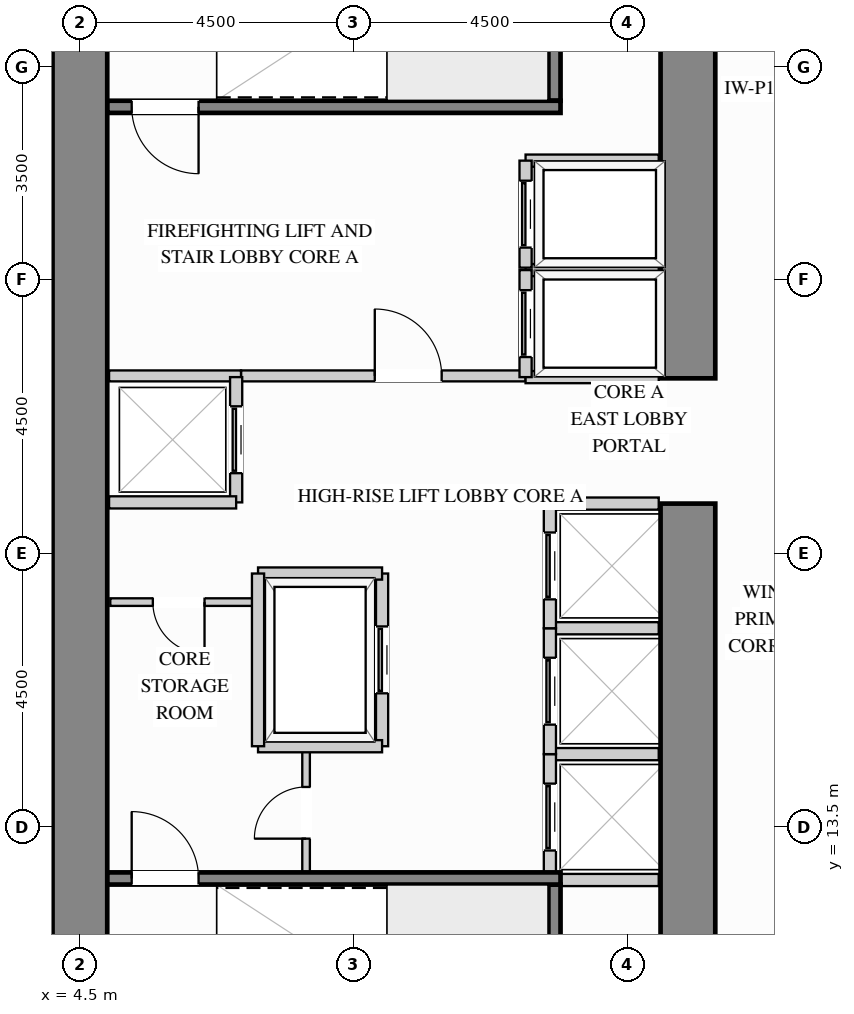
"""IFC4 building model, lengths in metres.
Left out: names, types, materials, properties, quantities, classifications, styles, units other than length and angle.
Written with IfcOpenShell. Run it as: python <this file> out.ifc"""

import sys

from ifc_helpers import new_model, si_unit, direction, frame, frame_2d, origin, place, context, subcontext, project, spatial, rectangle, extrude, source, transform, mapped, element, fill, save


model = new_model("IFC4")
c1 = context("Model", 3, precision=1e-05, world=origin(), true_north=direction((0.0, 1.0)))
c2 = subcontext(c1, "Body", "Model", "MODEL_VIEW")
j1 = project(units=[si_unit("LENGTHUNIT", "METRE"), si_unit("PLANEANGLEUNIT", "RADIAN")], contexts=[c1])
p1 = place(None, origin())
s1 = spatial("IfcSite", under=j1, at=p1, CompositionType="ELEMENT")
p2 = place(p1, origin())
s2 = spatial("IfcBuilding", under=s1, at=p2, CompositionType="ELEMENT")
p3 = place(p2, frame((0.0, 0.0, 40.5)))
s3 = spatial("IfcBuildingStorey", under=s2, at=p3, CompositionType="ELEMENT", Elevation=40.5)
m1 = source(origin(), c2, "Body", "SweptSolid", [
    extrude(rectangle(XDim=9.87, YDim=0.9, at=frame_2d((4.935, 0.0))), origin(), (0.0, 0.0, 1.0), 3.38),
])
p4 = place(p3, frame((14.5, 8.95, 0.0), z_axis=(0.0, 0.0, 1.0), x_axis=(0.0, 1.0, 0.0)))
e1 = element("IfcWall", 1, at=p4, inside=s3, PredefinedType="SHEAR", context=c2, shape_type="MappedRepresentation", body=[
    mapped(m1, transform((0.0, 0.0, 0.0), x_axis=(1.0, 0.0, 0.0), y_axis=(0.0, 1.0, 0.0), z_axis=(0.0, 0.0, 1.0))),
])
m2 = source(origin(), c2, "Body", "SweptSolid", [
    extrude(rectangle(XDim=8.17, YDim=0.9, at=frame_2d((4.085, 0.0))), origin(), (0.0, 0.0, 1.0), 3.38),
])
p5 = place(p3, frame((14.5, 20.88, 0.0), z_axis=(0.0, 0.0, 1.0), x_axis=(0.0, 1.0, 0.0)))
e2 = element("IfcWall", 2, at=p5, inside=s3, PredefinedType="SHEAR", context=c2, shape_type="MappedRepresentation", body=[
    mapped(m2, transform((0.0, 0.0, 0.0), x_axis=(1.0, 0.0, 0.0), y_axis=(0.0, 1.0, 0.0), z_axis=(0.0, 0.0, 1.0))),
])
m3 = source(origin(), c2, "Body", "SweptSolid", [
    extrude(rectangle(XDim=20.1, YDim=0.9, at=frame_2d((10.05, 0.0))), origin(), (0.0, 0.0, 1.0), 3.38),
])
p6 = place(p3, frame((4.5, 8.95, 0.0), z_axis=(0.0, 0.0, 1.0), x_axis=(0.0, 1.0, 0.0)))
e3 = element("IfcWall", 3, at=p6, inside=s3, PredefinedType="SHEAR", context=c2, shape_type="MappedRepresentation", body=[
    mapped(m3, transform((0.0, 0.0, 0.0), x_axis=(1.0, 0.0, 0.0), y_axis=(0.0, 1.0, 0.0), z_axis=(0.0, 0.0, 1.0))),
])
p7 = place(p3, frame((7.15, 20.92, 0.0), z_axis=(0.0, 0.0, 1.0), x_axis=(1.0, 0.0, 0.0)))
e4 = element("IfcWall", 4, at=p7, inside=s3, PredefinedType="PARTITIONING", context=c2, shape_type="SweptSolid", body=[
    extrude(rectangle(XDim=4.68, YDim=0.18, at=frame_2d((2.34, 0.0))), origin(), (0.0, 0.0, 1.0), 3.365),
])
p8 = place(p7, frame((2.2, 0.0, 0.0)))
e5 = element("IfcOpeningElement", 5, at=p8, cuts=e4, PredefinedType="OPENING", context=c2, shape_type="SweptSolid", body=[
    extrude(rectangle(XDim=1.1, YDim=2.15, at=frame_2d((0.55, 1.075))), frame((0.0, 0.1, 0.0), z_axis=(0.0, -1.0, 0.0), x_axis=(1.0, 0.0, 0.0)), (0.0, 0.0, 1.0), 0.2),
])
m4 = source(origin(), c2, "Body", "SweptSolid", [
    extrude(rectangle(XDim=2.17, YDim=0.18, at=frame_2d((1.085, 0.0))), origin(), (0.0, 0.0, 1.0), 3.365),
])
p9 = place(p3, frame((4.98, 20.92, 0.0), z_axis=(0.0, 0.0, 1.0), x_axis=(1.0, 0.0, 0.0)))
e6 = element("IfcWall", 6, at=p9, inside=s3, PredefinedType="PARTITIONING", context=c2, shape_type="MappedRepresentation", body=[
    mapped(m4, transform((0.0, 0.0, 0.0), x_axis=(1.0, 0.0, 0.0), y_axis=(0.0, 1.0, 0.0), z_axis=(0.0, 0.0, 1.0))),
])
p10 = place(p3, frame((8.22, 12.75, 0.0), z_axis=(0.0, 0.0, 1.0), x_axis=(0.0, 1.0, 0.0)))
e7 = element("IfcWall", 7, at=p10, inside=s3, PredefinedType="PARTITIONING", context=c2, shape_type="SweptSolid", body=[
    extrude(rectangle(XDim=2.07, YDim=0.125, at=frame_2d((1.035, 0.0))), origin(), (0.0, 0.0, 1.0), 3.365),
])
p11 = place(p10, frame((0.56, 0.0, 0.0)))
e8 = element("IfcOpeningElement", 8, at=p11, cuts=e7, PredefinedType="OPENING", context=c2, shape_type="SweptSolid", body=[
    extrude(rectangle(XDim=0.85, YDim=2.1, at=frame_2d((0.425, 1.05))), frame((0.0, 0.073, 0.0), z_axis=(0.0, -1.0, 0.0), x_axis=(1.0, 0.0, 0.0)), (0.0, 0.0, 1.0), 0.145),
])
p12 = place(p3, frame((5.0, 17.2, 0.0), z_axis=(0.0, 0.0, 1.0), x_axis=(1.0, 0.0, 0.0)))
e9 = element("IfcWall", 9, at=p12, inside=s3, PredefinedType="PARTITIONING", context=c2, shape_type="SweptSolid", body=[
    extrude(rectangle(XDim=2.4, YDim=0.125, at=frame_2d((1.2, 0.0))), origin(), (0.0, 0.0, 1.0), 3.365),
])
p13 = place(p12, frame((0.7, 0.0, 0.0)))
e10 = element("IfcOpeningElement", 10, at=p13, cuts=e9, PredefinedType="OPENING", context=c2, shape_type="SweptSolid", body=[
    extrude(rectangle(XDim=0.85, YDim=2.1, at=frame_2d((0.425, 1.05))), frame((0.0, 0.073, 0.0), z_axis=(0.0, -1.0, 0.0), x_axis=(1.0, 0.0, 0.0)), (0.0, 0.0, 1.0), 0.145),
])
m5 = source(origin(), c2, "Body", "SweptSolid", [
    extrude(rectangle(XDim=2.19, YDim=0.2, at=frame_2d((1.095, 0.0))), origin(), (0.0, 0.0, 1.0), 3.365),
])
for number, where, z_axis, x_axis in (
    (11, (11.83, 22.66, 0.0), (0.0, 0.0, 1.0), (1.0, 0.0, 0.0)),
    (12, (11.83, 20.9, 0.0), (0.0, 0.0, 1.0), (1.0, 0.0, 0.0)),
):
    element("IfcWall", number, at=place(p3, frame(where, z_axis=z_axis, x_axis=x_axis)), inside=s3, PredefinedType="PARTITIONING", context=c2, shape_type="MappedRepresentation", body=[
        mapped(m5, transform((0.0, 0.0, 0.0), x_axis=(1.0, 0.0, 0.0), y_axis=(0.0, 1.0, 0.0), z_axis=(0.0, 0.0, 1.0))),
    ])
p14 = place(p3, frame((11.83, 20.9, 0.0), z_axis=(0.0, 0.0, 1.0), x_axis=(0.0, 1.0, 0.0)))
e13 = element("IfcWall", 13, at=p14, inside=s3, PredefinedType="PARTITIONING", context=c2, shape_type="SweptSolid", body=[
    extrude(rectangle(XDim=1.76, YDim=0.2, at=frame_2d((0.88, 0.0))), origin(), (0.0, 0.0, 1.0), 3.365),
])
p15 = place(p14, frame((0.33, 0.0, 0.0)))
e14 = element("IfcOpeningElement", 14, at=p15, cuts=e13, PredefinedType="OPENING", context=c2, shape_type="SweptSolid", body=[
    extrude(rectangle(XDim=1.1, YDim=2.2, at=frame_2d((0.55, 1.1))), frame((0.0, 0.11, 0.0), z_axis=(0.0, -1.0, 0.0), x_axis=(1.0, 0.0, 0.0)), (0.0, 0.0, 1.0), 0.22),
])
p16 = place(p3, frame((11.83, 24.46, 0.0), z_axis=(0.0, 0.0, 1.0), x_axis=(1.0, 0.0, 0.0)))
e15 = element("IfcWall", 15, at=p16, inside=s3, PredefinedType="PARTITIONING", context=c2, shape_type="MappedRepresentation", body=[
    mapped(m5, transform((0.0, 0.0, 0.0), x_axis=(1.0, 0.0, 0.0), y_axis=(0.0, 1.0, 0.0), z_axis=(0.0, 0.0, 1.0))),
])
p17 = place(p3, frame((11.83, 22.7, 0.0), z_axis=(0.0, 0.0, 1.0), x_axis=(0.0, 1.0, 0.0)))
e16 = element("IfcWall", 16, at=p17, inside=s3, PredefinedType="PARTITIONING", context=c2, shape_type="SweptSolid", body=[
    extrude(rectangle(XDim=1.76, YDim=0.2, at=frame_2d((0.88, 0.0))), origin(), (0.0, 0.0, 1.0), 3.365),
])
p18 = place(p17, frame((0.33, 0.0, 0.0)))
e17 = element("IfcOpeningElement", 17, at=p18, cuts=e16, PredefinedType="OPENING", context=c2, shape_type="SweptSolid", body=[
    extrude(rectangle(XDim=1.1, YDim=2.2, at=frame_2d((0.55, 1.1))), frame((0.0, 0.11, 0.0), z_axis=(0.0, -1.0, 0.0), x_axis=(1.0, 0.0, 0.0)), (0.0, 0.0, 1.0), 0.22),
])
m6 = source(origin(), c2, "Body", "SweptSolid", [
    extrude(rectangle(XDim=1.79, YDim=0.2, at=frame_2d((0.895, 0.0))), origin(), (0.0, 0.0, 1.0), 3.365),
])
for number, where, z_axis, x_axis in (
    (18, (12.23, 14.7, 0.0), (0.0, 0.0, 1.0), (1.0, 0.0, 0.0)),
    (19, (12.23, 12.63, 0.0), (0.0, 0.0, 1.0), (1.0, 0.0, 0.0)),
):
    element("IfcWall", number, at=place(p3, frame(where, z_axis=z_axis, x_axis=x_axis)), inside=s3, PredefinedType="PARTITIONING", context=c2, shape_type="MappedRepresentation", body=[
        mapped(m6, transform((0.0, 0.0, 0.0), x_axis=(1.0, 0.0, 0.0), y_axis=(0.0, 1.0, 0.0), z_axis=(0.0, 0.0, 1.0))),
    ])
p19 = place(p3, frame((12.23, 12.63, 0.0), z_axis=(0.0, 0.0, 1.0), x_axis=(0.0, 1.0, 0.0)))
e20 = element("IfcWall", 20, at=p19, inside=s3, PredefinedType="PARTITIONING", context=c2, shape_type="SweptSolid", body=[
    extrude(rectangle(XDim=2.07, YDim=0.2, at=frame_2d((1.035, 0.0))), origin(), (0.0, 0.0, 1.0), 3.365),
])
p20 = place(p19, frame((0.485, 0.0, 0.0)))
e21 = element("IfcOpeningElement", 21, at=p20, cuts=e20, PredefinedType="OPENING", context=c2, shape_type="SweptSolid", body=[
    extrude(rectangle(XDim=1.1, YDim=2.2, at=frame_2d((0.55, 1.1))), frame((0.0, 0.11, 0.0), z_axis=(0.0, -1.0, 0.0), x_axis=(1.0, 0.0, 0.0)), (0.0, 0.0, 1.0), 0.22),
])
p21 = place(p3, frame((12.23, 16.77, 0.0), z_axis=(0.0, 0.0, 1.0), x_axis=(1.0, 0.0, 0.0)))
e22 = element("IfcWall", 22, at=p21, inside=s3, PredefinedType="PARTITIONING", context=c2, shape_type="MappedRepresentation", body=[
    mapped(m6, transform((0.0, 0.0, 0.0), x_axis=(1.0, 0.0, 0.0), y_axis=(0.0, 1.0, 0.0), z_axis=(0.0, 0.0, 1.0))),
])
p22 = place(p3, frame((12.23, 14.7, 0.0), z_axis=(0.0, 0.0, 1.0), x_axis=(0.0, 1.0, 0.0)))
e23 = element("IfcWall", 23, at=p22, inside=s3, PredefinedType="PARTITIONING", context=c2, shape_type="SweptSolid", body=[
    extrude(rectangle(XDim=2.07, YDim=0.2, at=frame_2d((1.035, 0.0))), origin(), (0.0, 0.0, 1.0), 3.365),
])
p23 = place(p22, frame((0.485, 0.0, 0.0)))
e24 = element("IfcOpeningElement", 24, at=p23, cuts=e23, PredefinedType="OPENING", context=c2, shape_type="SweptSolid", body=[
    extrude(rectangle(XDim=1.1, YDim=2.2, at=frame_2d((0.55, 1.1))), frame((0.0, 0.11, 0.0), z_axis=(0.0, -1.0, 0.0), x_axis=(1.0, 0.0, 0.0)), (0.0, 0.0, 1.0), 0.22),
])
p24 = place(p3, frame((12.23, 18.82, 0.0), z_axis=(0.0, 0.0, 1.0), x_axis=(1.0, 0.0, 0.0)))
e25 = element("IfcWall", 25, at=p24, inside=s3, PredefinedType="PARTITIONING", context=c2, shape_type="MappedRepresentation", body=[
    mapped(m6, transform((0.0, 0.0, 0.0), x_axis=(1.0, 0.0, 0.0), y_axis=(0.0, 1.0, 0.0), z_axis=(0.0, 0.0, 1.0))),
])
p25 = place(p3, frame((12.23, 16.77, 0.0), z_axis=(0.0, 0.0, 1.0), x_axis=(0.0, 1.0, 0.0)))
e26 = element("IfcWall", 26, at=p25, inside=s3, PredefinedType="PARTITIONING", context=c2, shape_type="SweptSolid", body=[
    extrude(rectangle(XDim=2.05, YDim=0.2, at=frame_2d((1.025, 0.0))), origin(), (0.0, 0.0, 1.0), 3.365),
])
p26 = place(p25, frame((0.475, 0.0, 0.0)))
e27 = element("IfcOpeningElement", 27, at=p26, cuts=e26, PredefinedType="OPENING", context=c2, shape_type="SweptSolid", body=[
    extrude(rectangle(XDim=1.1, YDim=2.2, at=frame_2d((0.55, 1.1))), frame((0.0, 0.11, 0.0), z_axis=(0.0, -1.0, 0.0), x_axis=(1.0, 0.0, 0.0)), (0.0, 0.0, 1.0), 0.22),
])
p27 = place(p3, frame((7.07, 18.84, 0.0), z_axis=(0.0, 0.0, 1.0), x_axis=(0.0, 1.0, 0.0)))
e28 = element("IfcWall", 28, at=p27, inside=s3, PredefinedType="PARTITIONING", context=c2, shape_type="SweptSolid", body=[
    extrude(rectangle(XDim=2.06, YDim=0.2, at=frame_2d((1.03, 0.0))), origin(), (0.0, 0.0, 1.0), 3.365),
])
p28 = place(p27, frame((0.48, 0.0, 0.0)))
e29 = element("IfcOpeningElement", 29, at=p28, cuts=e28, PredefinedType="OPENING", context=c2, shape_type="SweptSolid", body=[
    extrude(rectangle(XDim=1.1, YDim=2.2, at=frame_2d((0.55, 1.1))), frame((0.0, 0.11, 0.0), z_axis=(0.0, -1.0, 0.0), x_axis=(1.0, 0.0, 0.0)), (0.0, 0.0, 1.0), 0.22),
])
m7 = source(origin(), c2, "Body", "SweptSolid", [
    extrude(rectangle(XDim=2.09, YDim=0.2, at=frame_2d((1.045, 0.0))), origin(), (0.0, 0.0, 1.0), 3.365),
])
p29 = place(p3, frame((4.98, 18.84, 0.0), z_axis=(0.0, 0.0, 1.0), x_axis=(1.0, 0.0, 0.0)))
e30 = element("IfcWall", 30, at=p29, inside=s3, PredefinedType="PARTITIONING", context=c2, shape_type="MappedRepresentation", body=[
    mapped(m7, transform((0.0, 0.0, 0.0), x_axis=(1.0, 0.0, 0.0), y_axis=(0.0, 1.0, 0.0), z_axis=(0.0, 0.0, 1.0))),
])
p30 = place(p3, frame((9.47, 14.83, 0.0), z_axis=(0.0, 0.0, 1.0), x_axis=(0.0, 1.0, 0.0)))
e31 = element("IfcWall", 31, at=p30, inside=s3, PredefinedType="PARTITIONING", context=c2, shape_type="SweptSolid", body=[
    extrude(rectangle(XDim=2.84, YDim=0.2, at=frame_2d((1.42, 0.0))), origin(), (0.0, 0.0, 1.0), 3.365),
])
p31 = place(p30, frame((0.87, 0.0, 0.0)))
e32 = element("IfcOpeningElement", 32, at=p31, cuts=e31, PredefinedType="OPENING", context=c2, shape_type="SweptSolid", body=[
    extrude(rectangle(XDim=1.1, YDim=2.2, at=frame_2d((0.55, 1.1))), frame((0.0, 0.11, 0.0), z_axis=(0.0, -1.0, 0.0), x_axis=(1.0, 0.0, 0.0)), (0.0, 0.0, 1.0), 0.22),
])
m8 = source(origin(), c2, "Body", "SweptSolid", [
    extrude(rectangle(XDim=2.04, YDim=0.2, at=frame_2d((1.02, 0.0))), origin(), (0.0, 0.0, 1.0), 3.365),
])
for number, where, z_axis, x_axis in (
    (33, (7.43, 17.67, 0.0), (0.0, 0.0, 1.0), (1.0, 0.0, 0.0)),
    (34, (7.43, 14.83, 0.0), (0.0, 0.0, 1.0), (1.0, 0.0, 0.0)),
):
    element("IfcWall", number, at=place(p3, frame(where, z_axis=z_axis, x_axis=x_axis)), inside=s3, PredefinedType="PARTITIONING", context=c2, shape_type="MappedRepresentation", body=[
        mapped(m8, transform((0.0, 0.0, 0.0), x_axis=(1.0, 0.0, 0.0), y_axis=(0.0, 1.0, 0.0), z_axis=(0.0, 0.0, 1.0))),
    ])
m9 = source(origin(), c2, "Body", "SweptSolid", [
    extrude(rectangle(XDim=2.84, YDim=0.2, at=frame_2d((1.42, 0.0))), origin(), (0.0, 0.0, 1.0), 3.365),
])
p32 = place(p3, frame((7.43, 14.83, 0.0), z_axis=(0.0, 0.0, 1.0), x_axis=(0.0, 1.0, 0.0)))
e35 = element("IfcWall", 35, at=p32, inside=s3, PredefinedType="PARTITIONING", context=c2, shape_type="MappedRepresentation", body=[
    mapped(m9, transform((0.0, 0.0, 0.0), x_axis=(1.0, 0.0, 0.0), y_axis=(0.0, 1.0, 0.0), z_axis=(0.0, 0.0, 1.0))),
])
m10 = source(origin(), c2, "Body", "SweptSolid", [
    extrude(rectangle(XDim=3.603, YDim=0.2, at=frame_2d((1.802, 0.0))), origin(), (0.0, 0.0, 1.0), 3.38),
])
p33 = place(p3, frame((12.305, 8.952, 0.0), z_axis=(0.0, 0.0, 1.0), x_axis=(0.0, 1.0, 0.0)))
e36 = element("IfcWall", 36, at=p33, inside=s3, PredefinedType="SHEAR", context=c2, shape_type="MappedRepresentation", body=[
    mapped(m10, transform((0.0, 0.0, 0.0), x_axis=(1.0, 0.0, 0.0), y_axis=(0.0, 1.0, 0.0), z_axis=(0.0, 0.0, 1.0))),
])
p34 = place(p3, frame((4.952, 12.655, 0.0), z_axis=(0.0, 0.0, 1.0), x_axis=(1.0, 0.0, 0.0)))
e37 = element("IfcWall", 37, at=p34, inside=s3, PredefinedType="SHEAR", context=c2, shape_type="SweptSolid", body=[
    extrude(rectangle(XDim=7.453, YDim=0.2, at=frame_2d((3.727, 0.0))), origin(), (0.0, 0.0, 1.0), 3.38),
])
p35 = place(p34, frame((0.4, 0.0, 0.0)))
e38 = element("IfcOpeningElement", 38, at=p35, cuts=e37, PredefinedType="OPENING", context=c2, shape_type="SweptSolid", body=[
    extrude(rectangle(XDim=1.1, YDim=2.15, at=frame_2d((0.55, 1.075))), frame((0.0, 0.11, 0.0), z_axis=(0.0, -1.0, 0.0), x_axis=(1.0, 0.0, 0.0)), (0.0, 0.0, 1.0), 0.22),
])
p36 = place(p3, frame((12.305, 25.445, 0.0), z_axis=(0.0, 0.0, 1.0), x_axis=(0.0, 1.0, 0.0)))
e39 = element("IfcWall", 39, at=p36, inside=s3, PredefinedType="SHEAR", context=c2, shape_type="MappedRepresentation", body=[
    mapped(m10, transform((0.0, 0.0, 0.0), x_axis=(1.0, 0.0, 0.0), y_axis=(0.0, 1.0, 0.0), z_axis=(0.0, 0.0, 1.0))),
])
p37 = place(p3, frame((4.952, 25.345, 0.0), z_axis=(0.0, 0.0, 1.0), x_axis=(1.0, 0.0, 0.0)))
e40 = element("IfcWall", 40, at=p37, inside=s3, PredefinedType="SHEAR", context=c2, shape_type="SweptSolid", body=[
    extrude(rectangle(XDim=7.453, YDim=0.2, at=frame_2d((3.727, 0.0))), origin(), (0.0, 0.0, 1.0), 3.38),
])
p38 = place(p37, frame((0.4, 0.0, 0.0)))
e41 = element("IfcOpeningElement", 41, at=p38, cuts=e40, PredefinedType="OPENING", context=c2, shape_type="SweptSolid", body=[
    extrude(rectangle(XDim=1.1, YDim=2.15, at=frame_2d((0.55, 1.075))), frame((0.0, 0.11, 0.0), z_axis=(0.0, -1.0, 0.0), x_axis=(1.0, 0.0, 0.0)), (0.0, 0.0, 1.0), 0.22),
])
m11 = source(origin(), c2, "Body", "SweptSolid", [
    extrude(rectangle(XDim=1.1, YDim=2.15, at=frame_2d((0.55, 1.075))), frame((0.0, 0.025, 0.0), z_axis=(0.0, -1.0, 0.0), x_axis=(1.0, 0.0, 0.0)), (0.0, 0.0, 1.0), 0.05),
])
p39 = place(p8, origin())
e42 = element("IfcDoor", 42, at=p39, inside=s3, OperationType="SINGLE_SWING_LEFT", PredefinedType="DOOR", context=c2, shape_type="MappedRepresentation", body=[
    mapped(m11, transform((0.0, 0.0, 0.0), x_axis=(1.0, 0.0, 0.0), y_axis=(0.0, 1.0, 0.0), z_axis=(0.0, 0.0, 1.0))),
])
fill(e5, e42)
m12 = source(origin(), c2, "Body", "SweptSolid", [
    extrude(rectangle(XDim=1.1, YDim=2.2, at=frame_2d((0.55, 1.1))), frame((0.0, 0.025, 0.0), z_axis=(0.0, -1.0, 0.0), x_axis=(1.0, 0.0, 0.0)), (0.0, 0.0, 1.0), 0.05),
])
p40 = place(p15, origin())
e43 = element("IfcDoor", 43, at=p40, inside=s3, OperationType="SLIDING_TO_LEFT", PredefinedType="DOOR", context=c2, shape_type="MappedRepresentation", body=[
    mapped(m12, transform((0.0, 0.0, 0.0), x_axis=(1.0, 0.0, 0.0), y_axis=(0.0, 1.0, 0.0), z_axis=(0.0, 0.0, 1.0))),
])
fill(e14, e43)
p41 = place(p18, origin())
e44 = element("IfcDoor", 44, at=p41, inside=s3, OperationType="SLIDING_TO_LEFT", PredefinedType="DOOR", context=c2, shape_type="MappedRepresentation", body=[
    mapped(m12, transform((0.0, 0.0, 0.0), x_axis=(1.0, 0.0, 0.0), y_axis=(0.0, 1.0, 0.0), z_axis=(0.0, 0.0, 1.0))),
])
fill(e17, e44)
p42 = place(p20, origin())
e45 = element("IfcDoor", 45, at=p42, inside=s3, OperationType="SLIDING_TO_LEFT", PredefinedType="DOOR", context=c2, shape_type="MappedRepresentation", body=[
    mapped(m12, transform((0.0, 0.0, 0.0), x_axis=(1.0, 0.0, 0.0), y_axis=(0.0, 1.0, 0.0), z_axis=(0.0, 0.0, 1.0))),
])
fill(e21, e45)
p43 = place(p23, origin())
e46 = element("IfcDoor", 46, at=p43, inside=s3, OperationType="SLIDING_TO_LEFT", PredefinedType="DOOR", context=c2, shape_type="MappedRepresentation", body=[
    mapped(m12, transform((0.0, 0.0, 0.0), x_axis=(1.0, 0.0, 0.0), y_axis=(0.0, 1.0, 0.0), z_axis=(0.0, 0.0, 1.0))),
])
fill(e24, e46)
p44 = place(p26, origin())
e47 = element("IfcDoor", 47, at=p44, inside=s3, OperationType="SLIDING_TO_LEFT", PredefinedType="DOOR", context=c2, shape_type="MappedRepresentation", body=[
    mapped(m12, transform((0.0, 0.0, 0.0), x_axis=(1.0, 0.0, 0.0), y_axis=(0.0, 1.0, 0.0), z_axis=(0.0, 0.0, 1.0))),
])
fill(e27, e47)
p45 = place(p28, origin())
e48 = element("IfcDoor", 48, at=p45, inside=s3, OperationType="SLIDING_TO_LEFT", PredefinedType="DOOR", context=c2, shape_type="MappedRepresentation", body=[
    mapped(m12, transform((0.0, 0.0, 0.0), x_axis=(1.0, 0.0, 0.0), y_axis=(0.0, 1.0, 0.0), z_axis=(0.0, 0.0, 1.0))),
])
fill(e29, e48)
p46 = place(p31, origin())
e49 = element("IfcDoor", 49, at=p46, inside=s3, OperationType="SLIDING_TO_LEFT", PredefinedType="DOOR", context=c2, shape_type="MappedRepresentation", body=[
    mapped(m12, transform((0.0, 0.0, 0.0), x_axis=(1.0, 0.0, 0.0), y_axis=(0.0, 1.0, 0.0), z_axis=(0.0, 0.0, 1.0))),
])
fill(e32, e49)
m13 = source(origin(), c2, "Body", "SweptSolid", [
    extrude(rectangle(XDim=0.85, YDim=2.1, at=frame_2d((0.425, 1.05))), frame((0.0, 0.025, 0.0), z_axis=(0.0, -1.0, 0.0), x_axis=(1.0, 0.0, 0.0)), (0.0, 0.0, 1.0), 0.05),
])
p47 = place(p13, origin())
e50 = element("IfcDoor", 50, at=p47, inside=s3, OperationType="SINGLE_SWING_RIGHT", PredefinedType="DOOR", context=c2, shape_type="MappedRepresentation", body=[
    mapped(m13, transform((0.0, 0.0, 0.0), x_axis=(1.0, 0.0, 0.0), y_axis=(0.0, 1.0, 0.0), z_axis=(0.0, 0.0, 1.0))),
])
fill(e10, e50)
p48 = place(p11, origin())
e51 = element("IfcDoor", 51, at=p48, inside=s3, OperationType="SINGLE_SWING_LEFT", PredefinedType="DOOR", context=c2, shape_type="MappedRepresentation", body=[
    mapped(m13, transform((0.0, 0.0, 0.0), x_axis=(1.0, 0.0, 0.0), y_axis=(0.0, 1.0, 0.0), z_axis=(0.0, 0.0, 1.0))),
])
fill(e8, e51)
m14 = source(origin(), c2, "Body", "SweptSolid", [
    extrude(rectangle(XDim=1.1, YDim=2.15, at=frame_2d((0.55, 1.075))), frame((0.0, 0.025, 0.0), z_axis=(0.0, -1.0, 0.0), x_axis=(1.0, 0.0, 0.0)), (0.0, 0.0, 1.0), 0.05),
])
p49 = place(p35, origin())
e52 = element("IfcDoor", 52, at=p49, inside=s3, OperationType="SINGLE_SWING_LEFT", PredefinedType="DOOR", context=c2, shape_type="MappedRepresentation", body=[
    mapped(m14, transform((0.0, 0.0, 0.0), x_axis=(1.0, 0.0, 0.0), y_axis=(0.0, 1.0, 0.0), z_axis=(0.0, 0.0, 1.0))),
])
fill(e38, e52)
p50 = place(p38, origin())
e53 = element("IfcDoor", 53, at=p50, inside=s3, OperationType="SINGLE_SWING_RIGHT", PredefinedType="DOOR", context=c2, shape_type="MappedRepresentation", body=[
    mapped(m14, transform((0.0, 0.0, 0.0), x_axis=(1.0, 0.0, 0.0), y_axis=(0.0, 1.0, 0.0), z_axis=(0.0, 0.0, 1.0))),
])
fill(e41, e53)
save(model, sys.argv[1])
